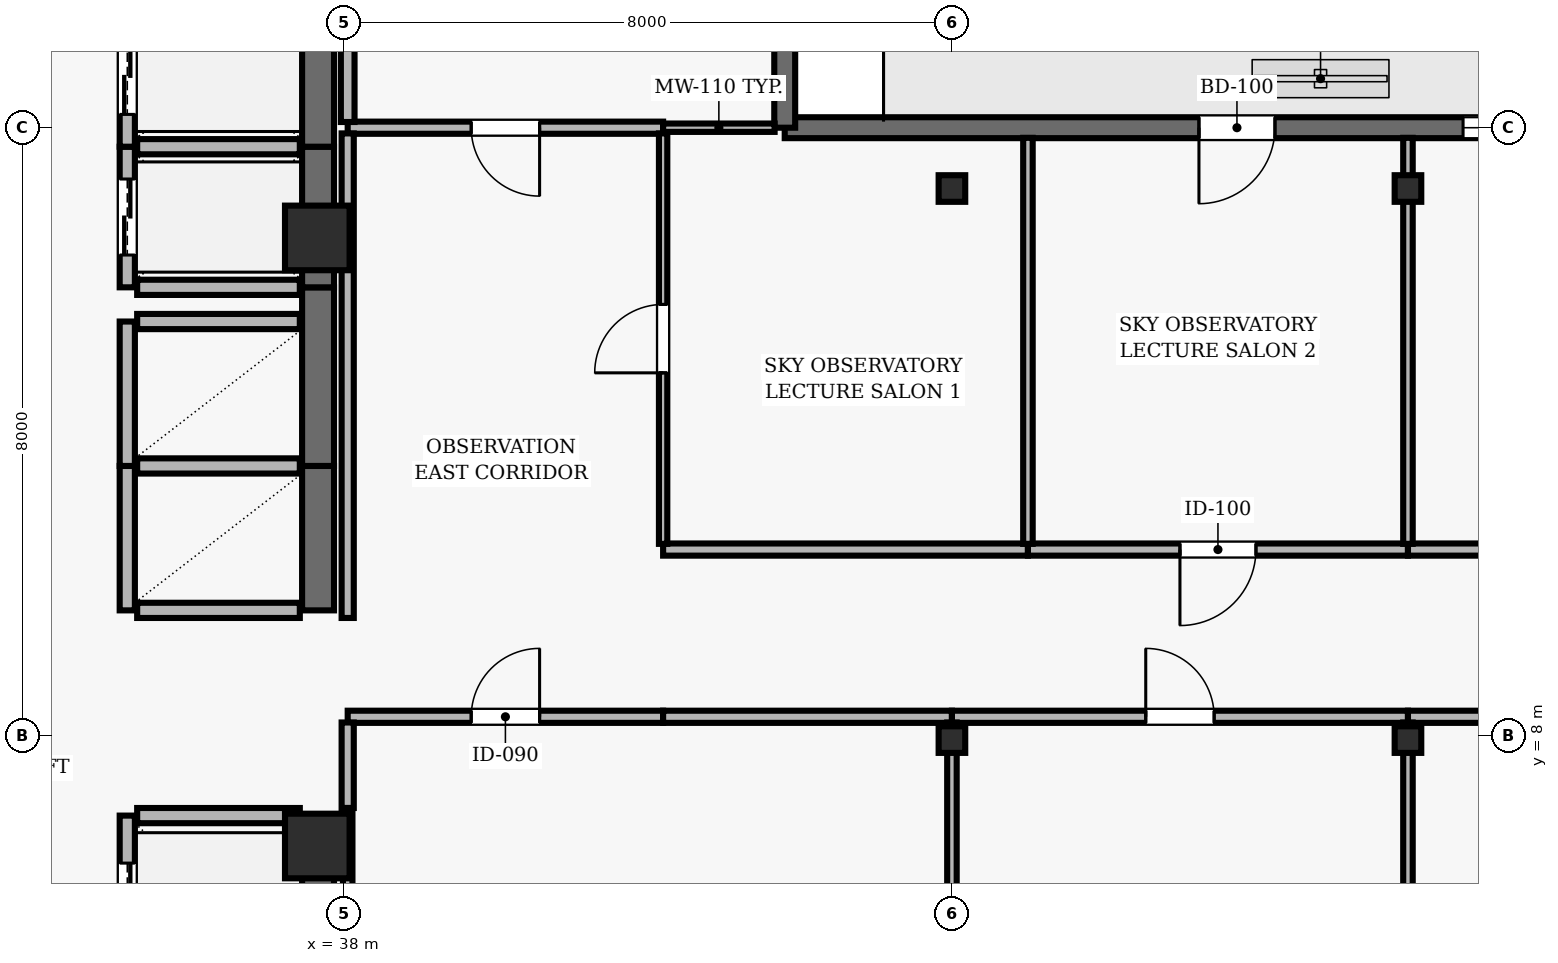
"""IFC4 building model, lengths in metres.
Left out: names, types, materials, properties, quantities, classifications, styles, units other than length and angle.
Written with IfcOpenShell. Run it as: python <this file> out.ifc"""

import sys

from ifc_helpers import new_model, si_unit, direction, frame, frame_2d, origin, origin_2d, place, context, subcontext, project, spatial, rectangle, hollow_rectangle, extrude, element, fill, save


model = new_model("IFC4")
c1 = context("Model", 3, precision=1e-05, world=origin(), true_north=direction((0.0, 1.0)))
c2 = subcontext(c1, "Body", "Model", "MODEL_VIEW")
j1 = project(units=[si_unit("LENGTHUNIT", "METRE"), si_unit("PLANEANGLEUNIT", "RADIAN")], contexts=[c1])
p1 = place(None, origin())
s1 = spatial("IfcSite", under=j1, at=p1, CompositionType="ELEMENT")
p2 = place(p1, origin())
s2 = spatial("IfcBuilding", under=s1, at=p2, CompositionType="ELEMENT")
p3 = place(p2, frame((0.0, 0.0, 306.7)))
s3 = spatial("IfcBuildingStorey", under=s2, at=p3, CompositionType="ELEMENT", Elevation=306.7)
for number, where, z_axis, x_axis in (
    (1, (37.65, 6.55, 0.0), (0.0, 0.0, 1.0), (1.0, 0.0, 0.0)),
    (2, (37.65, 14.55, 0.0), (0.0, 0.0, 1.0), (1.0, 0.0, 0.0)),
):
    element("IfcColumn", number, at=place(p3, frame(where, z_axis=z_axis, x_axis=x_axis)), inside=s3, PredefinedType="COLUMN", context=c2, shape_type="SweptSolid", body=[
        extrude(rectangle(XDim=0.85, YDim=0.85, at=origin_2d()), origin(), (0.0, 0.0, 1.0), 5.0),
    ])
for number, where, z_axis, x_axis in (
    (3, (46.0, 7.95, 0.0), (0.0, 0.0, 1.0), (1.0, 0.0, 0.0)),
    (4, (46.0, 15.2, 0.0), (0.0, 0.0, 1.0), (1.0, 0.0, 0.0)),
    (5, (52.0, 7.95, 0.0), (0.0, 0.0, 1.0), (1.0, 0.0, 0.0)),
    (6, (52.0, 15.2, 0.0), (0.0, 0.0, 1.0), (1.0, 0.0, 0.0)),
):
    element("IfcColumn", number, at=place(p3, frame(where, z_axis=z_axis, x_axis=x_axis)), inside=s3, PredefinedType="COLUMN", context=c2, shape_type="SweptSolid", body=[
        extrude(hollow_rectangle(XDim=0.35, YDim=0.35, WallThickness=0.016, at=origin_2d()), origin(), (0.0, 0.0, 1.0), 5.0),
    ])
p4 = place(p3, frame((57.3, 16.0, 0.0), z_axis=(0.0, 0.0, 1.0), x_axis=(-1.0, 0.0, 0.0)))
e7 = element("IfcWall", 7, at=p4, inside=s3, PredefinedType="SOLIDWALL", context=c2, shape_type="SweptSolid", body=[
    extrude(rectangle(XDim=13.5, YDim=0.275, at=frame_2d((6.75, 0.0))), origin(), (0.0, 0.0, 1.0), 4.74),
])
p5 = place(p4, frame((7.05, 0.0, 0.0)))
e8 = element("IfcOpeningElement", 8, at=p5, cuts=e7, PredefinedType="OPENING", context=c2, shape_type="SweptSolid", body=[
    extrude(rectangle(XDim=1.0, YDim=2.2, at=frame_2d((0.5, 1.1))), frame((0.0, 0.147, 0.0), z_axis=(0.0, -1.0, 0.0), x_axis=(1.0, 0.0, 0.0)), (0.0, 0.0, 1.0), 0.295),
])
p6 = place(p4, frame((2.175, 0.0, 0.9)))
e9 = element("IfcOpeningElement", 9, at=p6, cuts=e7, PredefinedType="OPENING", context=c2, shape_type="SweptSolid", body=[
    extrude(rectangle(XDim=2.4, YDim=1.8, at=frame_2d((1.2, 0.9))), frame((0.0, 0.147, 0.0), z_axis=(0.0, -1.0, 0.0), x_axis=(1.0, 0.0, 0.0)), (0.0, 0.0, 1.0), 0.295),
])
p7 = place(p3, frame((43.8, 16.0, 0.0), z_axis=(0.0, 0.0, 1.0), x_axis=(0.0, 1.0, 0.0)))
e10 = element("IfcWall", 10, at=p7, inside=s3, PredefinedType="SOLIDWALL", context=c2, shape_type="SweptSolid", body=[
    extrude(rectangle(XDim=4.6, YDim=0.275, at=frame_2d((2.3, 0.0))), origin(), (0.0, 0.0, 1.0), 4.74),
])
p8 = place(p3, frame((35.15, 6.95, 0.0), z_axis=(0.0, 0.0, 1.0), x_axis=(0.0, -1.0, 0.0)))
e11 = element("IfcWall", 11, at=p8, inside=s3, PredefinedType="SOLIDWALL", context=c2, shape_type="SweptSolid", body=[
    extrude(rectangle(XDim=2.25, YDim=0.2, at=frame_2d((1.125, 0.0))), origin(), (0.0, 0.0, 1.0), 4.74),
])
p9 = place(p8, frame((0.625, 0.0, 0.0)))
e12 = element("IfcOpeningElement", 12, at=p9, cuts=e11, PredefinedType="OPENING", context=c2, shape_type="SweptSolid", body=[
    extrude(rectangle(XDim=1.0, YDim=2.1, at=frame_2d((0.5, 1.05))), frame((0.0, 0.11, 0.0), z_axis=(0.0, -1.0, 0.0), x_axis=(1.0, 0.0, 0.0)), (0.0, 0.0, 1.0), 0.22),
])
p10 = place(p3, frame((37.66, 4.7, 0.0), z_axis=(0.0, 0.0, 1.0), x_axis=(0.0, 1.0, 0.0)))
e13 = element("IfcWall", 13, at=p10, inside=s3, PredefinedType="SHEAR", context=c2, shape_type="SweptSolid", body=[
    extrude(rectangle(XDim=2.25, YDim=0.42, at=frame_2d((1.125, 0.0))), origin(), (0.0, 0.0, 1.0), 4.74),
])
p11 = place(p3, frame((37.42, 6.95, 0.0), z_axis=(0.0, 0.0, 1.0), x_axis=(-1.0, 0.0, 0.0)))
e14 = element("IfcWall", 14, at=p11, inside=s3, PredefinedType="SOLIDWALL", context=c2, shape_type="SweptSolid", body=[
    extrude(rectangle(XDim=2.14, YDim=0.2, at=frame_2d((1.07, 0.0))), origin(), (0.0, 0.0, 1.0), 4.74),
])
p12 = place(p3, frame((35.15, 11.55, 0.0), z_axis=(0.0, 0.0, 1.0), x_axis=(0.0, -1.0, 0.0)))
e15 = element("IfcWall", 15, at=p12, inside=s3, PredefinedType="SOLIDWALL", context=c2, shape_type="SweptSolid", body=[
    extrude(rectangle(XDim=1.9, YDim=0.2, at=frame_2d((0.95, 0.0))), origin(), (0.0, 0.0, 1.0), 4.74),
])
p13 = place(p3, frame((37.66, 9.65, 0.0), z_axis=(0.0, 0.0, 1.0), x_axis=(0.0, 1.0, 0.0)))
e16 = element("IfcWall", 16, at=p13, inside=s3, PredefinedType="SHEAR", context=c2, shape_type="SweptSolid", body=[
    extrude(rectangle(XDim=1.9, YDim=0.42, at=frame_2d((0.95, 0.0))), origin(), (0.0, 0.0, 1.0), 4.74),
])
for number, where, z_axis, x_axis in (
    (17, (35.28, 9.65, 0.0), (0.0, 0.0, 1.0), (1.0, 0.0, 0.0)),
    (18, (37.42, 11.55, 0.0), (0.0, 0.0, 1.0), (-1.0, 0.0, 0.0)),
):
    element("IfcWall", number, at=place(p3, frame(where, z_axis=z_axis, x_axis=x_axis)), inside=s3, PredefinedType="SOLIDWALL", context=c2, shape_type="SweptSolid", body=[
        extrude(rectangle(XDim=2.14, YDim=0.2, at=frame_2d((1.07, 0.0))), origin(), (0.0, 0.0, 1.0), 4.74),
    ])
p14 = place(p3, frame((35.15, 13.45, 0.0), z_axis=(0.0, 0.0, 1.0), x_axis=(0.0, -1.0, 0.0)))
e19 = element("IfcWall", 19, at=p14, inside=s3, PredefinedType="SOLIDWALL", context=c2, shape_type="SweptSolid", body=[
    extrude(rectangle(XDim=1.9, YDim=0.2, at=frame_2d((0.95, 0.0))), origin(), (0.0, 0.0, 1.0), 4.74),
])
p15 = place(p3, frame((37.66, 11.55, 0.0), z_axis=(0.0, 0.0, 1.0), x_axis=(0.0, 1.0, 0.0)))
e20 = element("IfcWall", 20, at=p15, inside=s3, PredefinedType="SHEAR", context=c2, shape_type="SweptSolid", body=[
    extrude(rectangle(XDim=2.35, YDim=0.42, at=frame_2d((1.175, 0.0))), origin(), (0.0, 0.0, 1.0), 4.74),
])
p16 = place(p3, frame((37.42, 13.45, 0.0), z_axis=(0.0, 0.0, 1.0), x_axis=(-1.0, 0.0, 0.0)))
e21 = element("IfcWall", 21, at=p16, inside=s3, PredefinedType="SOLIDWALL", context=c2, shape_type="SweptSolid", body=[
    extrude(rectangle(XDim=2.14, YDim=0.2, at=frame_2d((1.07, 0.0))), origin(), (0.0, 0.0, 1.0), 4.74),
])
p17 = place(p3, frame((35.15, 15.75, 0.0), z_axis=(0.0, 0.0, 1.0), x_axis=(0.0, -1.0, 0.0)))
e22 = element("IfcWall", 22, at=p17, inside=s3, PredefinedType="SOLIDWALL", context=c2, shape_type="SweptSolid", body=[
    extrude(rectangle(XDim=1.85, YDim=0.2, at=frame_2d((0.925, 0.0))), origin(), (0.0, 0.0, 1.0), 4.74),
])
p18 = place(p17, frame((0.425, 0.0, 0.0)))
e23 = element("IfcOpeningElement", 23, at=p18, cuts=e22, PredefinedType="OPENING", context=c2, shape_type="SweptSolid", body=[
    extrude(rectangle(XDim=1.0, YDim=2.1, at=frame_2d((0.5, 1.05))), frame((0.0, 0.11, 0.0), z_axis=(0.0, -1.0, 0.0), x_axis=(1.0, 0.0, 0.0)), (0.0, 0.0, 1.0), 0.22),
])
p19 = place(p3, frame((37.66, 13.9, 0.0), z_axis=(0.0, 0.0, 1.0), x_axis=(0.0, 1.0, 0.0)))
e24 = element("IfcWall", 24, at=p19, inside=s3, PredefinedType="SHEAR", context=c2, shape_type="SweptSolid", body=[
    extrude(rectangle(XDim=1.85, YDim=0.42, at=frame_2d((0.925, 0.0))), origin(), (0.0, 0.0, 1.0), 4.74),
])
for number, where, z_axis, x_axis in (
    (25, (35.28, 13.9, 0.0), (0.0, 0.0, 1.0), (1.0, 0.0, 0.0)),
    (26, (37.42, 15.75, 0.0), (0.0, 0.0, 1.0), (-1.0, 0.0, 0.0)),
):
    element("IfcWall", number, at=place(p3, frame(where, z_axis=z_axis, x_axis=x_axis)), inside=s3, PredefinedType="SOLIDWALL", context=c2, shape_type="SweptSolid", body=[
        extrude(rectangle(XDim=2.14, YDim=0.2, at=frame_2d((1.07, 0.0))), origin(), (0.0, 0.0, 1.0), 4.74),
    ])
p20 = place(p3, frame((35.15, 17.6, 0.0), z_axis=(0.0, 0.0, 1.0), x_axis=(0.0, -1.0, 0.0)))
e27 = element("IfcWall", 27, at=p20, inside=s3, PredefinedType="SOLIDWALL", context=c2, shape_type="SweptSolid", body=[
    extrude(rectangle(XDim=1.85, YDim=0.2, at=frame_2d((0.925, 0.0))), origin(), (0.0, 0.0, 1.0), 4.74),
])
p21 = place(p20, frame((0.425, 0.0, 0.0)))
e28 = element("IfcOpeningElement", 28, at=p21, cuts=e27, PredefinedType="OPENING", context=c2, shape_type="SweptSolid", body=[
    extrude(rectangle(XDim=1.0, YDim=2.1, at=frame_2d((0.5, 1.05))), frame((0.0, 0.11, 0.0), z_axis=(0.0, -1.0, 0.0), x_axis=(1.0, 0.0, 0.0)), (0.0, 0.0, 1.0), 0.22),
])
p22 = place(p3, frame((37.66, 15.75, 0.0), z_axis=(0.0, 0.0, 1.0), x_axis=(0.0, 1.0, 0.0)))
e29 = element("IfcWall", 29, at=p22, inside=s3, PredefinedType="SHEAR", context=c2, shape_type="SweptSolid", body=[
    extrude(rectangle(XDim=1.85, YDim=0.42, at=frame_2d((0.925, 0.0))), origin(), (0.0, 0.0, 1.0), 4.74),
])
p23 = place(p3, frame((38.05, 8.25, 0.0), z_axis=(0.0, 0.0, 1.0), x_axis=(1.0, 0.0, 0.0)))
e30 = element("IfcWall", 30, at=p23, inside=s3, PredefinedType="PARTITIONING", context=c2, shape_type="SweptSolid", body=[
    extrude(rectangle(XDim=4.15, YDim=0.16, at=frame_2d((2.075, 0.0))), origin(), (0.0, 0.0, 1.0), 4.277),
])
p24 = place(p23, frame((1.625, 0.0, 0.0)))
e31 = element("IfcOpeningElement", 31, at=p24, cuts=e30, PredefinedType="OPENING", context=c2, shape_type="SweptSolid", body=[
    extrude(rectangle(XDim=0.9, YDim=2.1, at=frame_2d((0.45, 1.05))), frame((0.0, 0.09, 0.0), z_axis=(0.0, -1.0, 0.0), x_axis=(1.0, 0.0, 0.0)), (0.0, 0.0, 1.0), 0.18),
])
p25 = place(p3, frame((42.2, 8.25, 0.0), z_axis=(0.0, 0.0, 1.0), x_axis=(1.0, 0.0, 0.0)))
e32 = element("IfcWall", 32, at=p25, inside=s3, PredefinedType="PARTITIONING", context=c2, shape_type="SweptSolid", body=[
    extrude(rectangle(XDim=3.8, YDim=0.16, at=frame_2d((1.9, 0.0))), origin(), (0.0, 0.0, 1.0), 4.277),
])
p26 = place(p3, frame((42.2, 16.0, 0.0), z_axis=(0.0, 0.0, 1.0), x_axis=(-1.0, 0.0, 0.0)))
e33 = element("IfcWall", 33, at=p26, inside=s3, PredefinedType="PARTITIONING", context=c2, shape_type="SweptSolid", body=[
    extrude(rectangle(XDim=4.15, YDim=0.16, at=frame_2d((2.075, 0.0))), origin(), (0.0, 0.0, 1.0), 4.44),
])
p27 = place(p26, frame((1.625, 0.0, 0.0)))
e34 = element("IfcOpeningElement", 34, at=p27, cuts=e33, PredefinedType="OPENING", context=c2, shape_type="SweptSolid", body=[
    extrude(rectangle(XDim=0.9, YDim=2.1, at=frame_2d((0.45, 1.05))), frame((0.0, 0.09, 0.0), z_axis=(0.0, -1.0, 0.0), x_axis=(1.0, 0.0, 0.0)), (0.0, 0.0, 1.0), 0.18),
])
p28 = place(p3, frame((42.2, 16.0, 0.0), z_axis=(0.0, 0.0, 1.0), x_axis=(1.0, 0.0, 0.0)))
e35 = element("IfcWall", 35, at=p28, inside=s3, PredefinedType="MOVABLE", context=c2, shape_type="SweptSolid", body=[
    extrude(rectangle(XDim=1.467, YDim=0.11, at=frame_2d((0.733, 0.0))), origin(), (0.0, 0.0, 1.0), 4.44),
])
p29 = place(p3, frame((46.0, 8.25, 0.0), z_axis=(0.0, 0.0, 1.0), x_axis=(1.0, 0.0, 0.0)))
e36 = element("IfcWall", 36, at=p29, inside=s3, PredefinedType="PARTITIONING", context=c2, shape_type="SweptSolid", body=[
    extrude(rectangle(XDim=6.0, YDim=0.16, at=frame_2d((3.0, 0.0))), origin(), (0.0, 0.0, 1.0), 4.277),
])
p30 = place(p29, frame((2.55, 0.0, 0.0)))
e37 = element("IfcOpeningElement", 37, at=p30, cuts=e36, PredefinedType="OPENING", context=c2, shape_type="SweptSolid", body=[
    extrude(rectangle(XDim=0.9, YDim=2.1, at=frame_2d((0.45, 1.05))), frame((0.0, 0.09, 0.0), z_axis=(0.0, -1.0, 0.0), x_axis=(1.0, 0.0, 0.0)), (0.0, 0.0, 1.0), 0.18),
])
p31 = place(p3, frame((47.0, 10.45, 0.0), z_axis=(0.0, 0.0, 1.0), x_axis=(-1.0, 0.0, 0.0)))
e38 = element("IfcWall", 38, at=p31, inside=s3, PredefinedType="PARTITIONING", context=c2, shape_type="SweptSolid", body=[
    extrude(rectangle(XDim=4.8, YDim=0.16, at=frame_2d((2.4, 0.0))), origin(), (0.0, 0.0, 1.0), 4.474),
])
p32 = place(p3, frame((52.0, 8.25, 0.0), z_axis=(0.0, 0.0, 1.0), x_axis=(1.0, 0.0, 0.0)))
e39 = element("IfcWall", 39, at=p32, inside=s3, PredefinedType="PARTITIONING", context=c2, shape_type="SweptSolid", body=[
    extrude(rectangle(XDim=7.72, YDim=0.16, at=frame_2d((3.86, 0.0))), origin(), (0.0, 0.0, 1.0), 4.277),
])
p33 = place(p32, frame((3.41, 0.0, 0.0)))
e40 = element("IfcOpeningElement", 40, at=p33, cuts=e39, PredefinedType="OPENING", context=c2, shape_type="SweptSolid", body=[
    extrude(rectangle(XDim=0.9, YDim=2.1, at=frame_2d((0.45, 1.05))), frame((0.0, 0.09, 0.0), z_axis=(0.0, -1.0, 0.0), x_axis=(1.0, 0.0, 0.0)), (0.0, 0.0, 1.0), 0.18),
])
p34 = place(p3, frame((52.0, 10.45, 0.0), z_axis=(0.0, 0.0, 1.0), x_axis=(-1.0, 0.0, 0.0)))
e41 = element("IfcWall", 41, at=p34, inside=s3, PredefinedType="PARTITIONING", context=c2, shape_type="SweptSolid", body=[
    extrude(rectangle(XDim=5.0, YDim=0.16, at=frame_2d((2.5, 0.0))), origin(), (0.0, 0.0, 1.0), 4.474),
])
p35 = place(p34, frame((2.0, 0.0, 0.0)))
e42 = element("IfcOpeningElement", 42, at=p35, cuts=e41, PredefinedType="OPENING", context=c2, shape_type="SweptSolid", body=[
    extrude(rectangle(XDim=1.0, YDim=2.1, at=frame_2d((0.5, 1.05))), frame((0.0, 0.09, 0.0), z_axis=(0.0, -1.0, 0.0), x_axis=(1.0, 0.0, 0.0)), (0.0, 0.0, 1.0), 0.18),
])
p36 = place(p3, frame((59.72, 10.45, 0.0), z_axis=(0.0, 0.0, 1.0), x_axis=(-1.0, 0.0, 0.0)))
e43 = element("IfcWall", 43, at=p36, inside=s3, PredefinedType="PARTITIONING", context=c2, shape_type="SweptSolid", body=[
    extrude(rectangle(XDim=7.72, YDim=0.16, at=frame_2d((3.86, 0.0))), origin(), (0.0, 0.0, 1.0), 4.474),
])
p37 = place(p3, frame((38.05, 7.05, 0.0), z_axis=(0.0, 0.0, 1.0), x_axis=(0.0, 1.0, 0.0)))
e44 = element("IfcWall", 44, at=p37, inside=s3, PredefinedType="PARTITIONING", context=c2, shape_type="SweptSolid", body=[
    extrude(rectangle(XDim=1.125, YDim=0.16, at=frame_2d((0.562, 0.0))), origin(), (0.0, 0.0, 1.0), 4.277),
])
p38 = place(p3, frame((38.05, 7.05, 0.0), z_axis=(0.0, 0.0, 1.0), x_axis=(0.0, -1.0, 0.0)))
e45 = element("IfcWall", 45, at=p38, inside=s3, PredefinedType="PARTITIONING", context=c2, shape_type="SweptSolid", body=[
    extrude(rectangle(XDim=6.917, YDim=0.125, at=frame_2d((3.458, 0.0))), origin(), (0.0, 0.0, 1.0), 4.277),
])
p39 = place(p3, frame((38.05, 15.925, 0.0), z_axis=(0.0, 0.0, 1.0), x_axis=(0.0, -1.0, 0.0)))
e46 = element("IfcWall", 46, at=p39, inside=s3, PredefinedType="PARTITIONING", context=c2, shape_type="SweptSolid", body=[
    extrude(rectangle(XDim=6.375, YDim=0.16, at=frame_2d((3.188, 0.0))), origin(), (0.0, 0.0, 1.0), 4.277),
])
p40 = place(p3, frame((38.05, 21.668, 0.0), z_axis=(0.0, 0.0, 1.0), x_axis=(0.0, -1.0, 0.0)))
e47 = element("IfcWall", 47, at=p40, inside=s3, PredefinedType="PARTITIONING", context=c2, shape_type="SweptSolid", body=[
    extrude(rectangle(XDim=5.593, YDim=0.18, at=frame_2d((2.796, 0.0))), origin(), (0.0, 0.0, 1.0), 4.277),
])
p41 = place(p3, frame((42.2, 10.525, 0.0), z_axis=(0.0, 0.0, 1.0), x_axis=(0.0, 1.0, 0.0)))
e48 = element("IfcWall", 48, at=p41, inside=s3, PredefinedType="MOVABLE", context=c2, shape_type="SweptSolid", body=[
    extrude(rectangle(XDim=5.4, YDim=0.11, at=frame_2d((2.7, 0.0))), origin(), (0.0, 0.0, 1.0), 4.74),
])
p42 = place(p41, frame((2.25, 0.0, 0.0)))
e49 = element("IfcOpeningElement", 49, at=p42, cuts=e48, PredefinedType="OPENING", context=c2, shape_type="SweptSolid", body=[
    extrude(rectangle(XDim=0.9, YDim=2.1, at=frame_2d((0.45, 1.05))), frame((0.0, 0.065, 0.0), z_axis=(0.0, -1.0, 0.0), x_axis=(1.0, 0.0, 0.0)), (0.0, 0.0, 1.0), 0.13),
])
p43 = place(p3, frame((46.0, 0.133, 0.0), z_axis=(0.0, 0.0, 1.0), x_axis=(0.0, 1.0, 0.0)))
e50 = element("IfcWall", 50, at=p43, inside=s3, PredefinedType="PARTITIONING", context=c2, shape_type="SweptSolid", body=[
    extrude(rectangle(XDim=8.042, YDim=0.125, at=frame_2d((4.021, 0.0))), origin(), (0.0, 0.0, 1.0), 4.277),
])
p44 = place(p3, frame((47.0, 10.525, 0.0), z_axis=(0.0, 0.0, 1.0), x_axis=(0.0, 1.0, 0.0)))
e51 = element("IfcWall", 51, at=p44, inside=s3, PredefinedType="PARTITIONING", context=c2, shape_type="SweptSolid", body=[
    extrude(rectangle(XDim=5.342, YDim=0.125, at=frame_2d((2.671, 0.0))), origin(), (0.0, 0.0, 1.0), 4.74),
])
p45 = place(p3, frame((52.0, 0.133, 0.0), z_axis=(0.0, 0.0, 1.0), x_axis=(0.0, 1.0, 0.0)))
e52 = element("IfcWall", 52, at=p45, inside=s3, PredefinedType="PARTITIONING", context=c2, shape_type="SweptSolid", body=[
    extrude(rectangle(XDim=8.042, YDim=0.125, at=frame_2d((4.021, 0.0))), origin(), (0.0, 0.0, 1.0), 4.277),
])
p46 = place(p3, frame((52.0, 10.525, 0.0), z_axis=(0.0, 0.0, 1.0), x_axis=(0.0, 1.0, 0.0)))
e53 = element("IfcWall", 53, at=p46, inside=s3, PredefinedType="PARTITIONING", context=c2, shape_type="SweptSolid", body=[
    extrude(rectangle(XDim=5.342, YDim=0.125, at=frame_2d((2.671, 0.0))), origin(), (0.0, 0.0, 1.0), 4.277),
])
p47 = place(p5, origin())
e54 = element("IfcDoor", 54, at=p47, inside=s3, OperationType="SINGLE_SWING_RIGHT", PredefinedType="DOOR", context=c2, shape_type="SweptSolid", body=[
    extrude(rectangle(XDim=1.0, YDim=2.2, at=frame_2d((0.5, 1.1))), frame((0.0, 0.025, 0.0), z_axis=(0.0, -1.0, 0.0), x_axis=(1.0, 0.0, 0.0)), (0.0, 0.0, 1.0), 0.05),
])
fill(e8, e54)
p48 = place(p6, origin())
e55 = element("IfcWindow", 55, at=p48, inside=s3, PartitioningType="SINGLE_PANEL", PredefinedType="WINDOW", context=c2, shape_type="SweptSolid", body=[
    extrude(rectangle(XDim=2.4, YDim=1.8, at=frame_2d((1.2, 0.9))), frame((0.0, 0.03, 0.0), z_axis=(0.0, -1.0, 0.0), x_axis=(1.0, 0.0, 0.0)), (0.0, 0.0, 1.0), 0.06),
])
fill(e9, e55)
p49 = place(p9, origin())
e56 = element("IfcDoor", 56, at=p49, inside=s3, OperationType="DOUBLE_DOOR_SLIDING", PredefinedType="DOOR", context=c2, shape_type="SweptSolid", body=[
    extrude(rectangle(XDim=1.0, YDim=2.1, at=frame_2d((0.5, 1.05))), frame((0.0, 0.025, 0.0), z_axis=(0.0, -1.0, 0.0), x_axis=(1.0, 0.0, 0.0)), (0.0, 0.0, 1.0), 0.05),
])
fill(e12, e56)
p50 = place(p18, origin())
e57 = element("IfcDoor", 57, at=p50, inside=s3, OperationType="DOUBLE_DOOR_SLIDING", PredefinedType="DOOR", context=c2, shape_type="SweptSolid", body=[
    extrude(rectangle(XDim=1.0, YDim=2.1, at=frame_2d((0.5, 1.05))), frame((0.0, 0.025, 0.0), z_axis=(0.0, -1.0, 0.0), x_axis=(1.0, 0.0, 0.0)), (0.0, 0.0, 1.0), 0.05),
])
fill(e23, e57)
p51 = place(p21, origin())
e58 = element("IfcDoor", 58, at=p51, inside=s3, OperationType="DOUBLE_DOOR_SLIDING", PredefinedType="DOOR", context=c2, shape_type="SweptSolid", body=[
    extrude(rectangle(XDim=1.0, YDim=2.1, at=frame_2d((0.5, 1.05))), frame((0.0, 0.025, 0.0), z_axis=(0.0, -1.0, 0.0), x_axis=(1.0, 0.0, 0.0)), (0.0, 0.0, 1.0), 0.05),
])
fill(e28, e58)
p52 = place(p24, origin())
e59 = element("IfcDoor", 59, at=p52, inside=s3, OperationType="SINGLE_SWING_RIGHT", PredefinedType="DOOR", context=c2, shape_type="SweptSolid", body=[
    extrude(rectangle(XDim=0.9, YDim=2.1, at=frame_2d((0.45, 1.05))), frame((0.0, 0.025, 0.0), z_axis=(0.0, -1.0, 0.0), x_axis=(1.0, 0.0, 0.0)), (0.0, 0.0, 1.0), 0.05),
])
fill(e31, e59)
p53 = place(p30, origin())
e60 = element("IfcDoor", 60, at=p53, inside=s3, OperationType="SINGLE_SWING_LEFT", PredefinedType="DOOR", context=c2, shape_type="SweptSolid", body=[
    extrude(rectangle(XDim=0.9, YDim=2.1, at=frame_2d((0.45, 1.05))), frame((0.0, 0.025, 0.0), z_axis=(0.0, -1.0, 0.0), x_axis=(1.0, 0.0, 0.0)), (0.0, 0.0, 1.0), 0.05),
])
fill(e37, e60)
p54 = place(p42, origin())
e61 = element("IfcDoor", 61, at=p54, inside=s3, OperationType="SINGLE_SWING_LEFT", PredefinedType="DOOR", context=c2, shape_type="SweptSolid", body=[
    extrude(rectangle(XDim=0.9, YDim=2.1, at=frame_2d((0.45, 1.05))), frame((0.0, 0.025, 0.0), z_axis=(0.0, -1.0, 0.0), x_axis=(1.0, 0.0, 0.0)), (0.0, 0.0, 1.0), 0.05),
])
fill(e49, e61)
p55 = place(p35, origin())
e62 = element("IfcDoor", 62, at=p55, inside=s3, OperationType="SINGLE_SWING_RIGHT", PredefinedType="DOOR", context=c2, shape_type="SweptSolid", body=[
    extrude(rectangle(XDim=1.0, YDim=2.1, at=frame_2d((0.5, 1.05))), frame((0.0, 0.025, 0.0), z_axis=(0.0, -1.0, 0.0), x_axis=(1.0, 0.0, 0.0)), (0.0, 0.0, 1.0), 0.05),
])
fill(e42, e62)
p56 = place(p27, origin())
e63 = element("IfcDoor", 63, at=p56, inside=s3, OperationType="SINGLE_SWING_LEFT", PredefinedType="DOOR", context=c2, shape_type="SweptSolid", body=[
    extrude(rectangle(XDim=0.9, YDim=2.1, at=frame_2d((0.45, 1.05))), frame((0.0, 0.025, 0.0), z_axis=(0.0, -1.0, 0.0), x_axis=(1.0, 0.0, 0.0)), (0.0, 0.0, 1.0), 0.05),
])
fill(e34, e63)
save(model, sys.argv[1])
